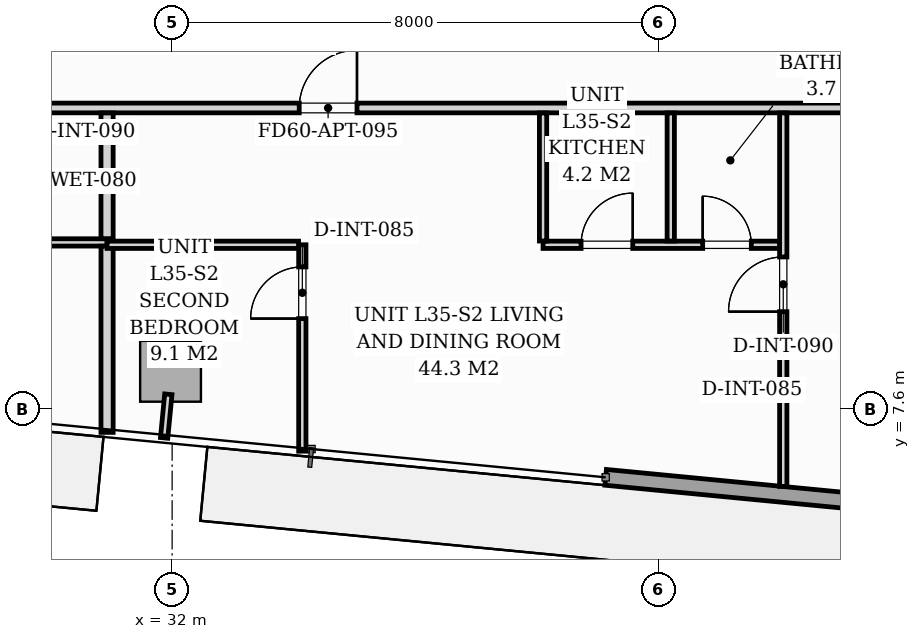
"""IFC4 building model, lengths in metres.
Left out: names, types, materials, properties, quantities, classifications, styles, units other than length and angle.
Written with IfcOpenShell. Run it as: python <this file> out.ifc"""

import sys

from ifc_helpers import new_model, si_unit, direction, frame, frame_2d, origin, origin_2d, place, context, subcontext, project, spatial, rectangle, extrude, source, transform, mapped, element, fill, save


model = new_model("IFC4")
c1 = context("Model", 3, precision=1e-05, world=origin(), true_north=direction((0.0, 1.0)))
c2 = subcontext(c1, "Body", "Model", "MODEL_VIEW")
j1 = project(units=[si_unit("LENGTHUNIT", "METRE"), si_unit("PLANEANGLEUNIT", "RADIAN")], contexts=[c1])
p1 = place(None, origin())
s1 = spatial("IfcSite", under=j1, at=p1, CompositionType="ELEMENT")
p2 = place(p1, origin())
s2 = spatial("IfcBuilding", under=s1, at=p2, CompositionType="ELEMENT")
p3 = place(p2, frame((0.0, 0.0, 124.6)))
s3 = spatial("IfcBuildingStorey", under=s2, at=p3, CompositionType="ELEMENT", Elevation=124.6)
m1 = source(origin(), c2, "Body", "SweptSolid", [
    extrude(rectangle(XDim=1.0, YDim=1.0, at=origin_2d()), origin(), (0.0, 0.0, 1.0), 3.194),
])
for number, where, z_axis, x_axis in (
    (1, (31.974, 8.22, 0.004), (0.0, 0.0, 1.0), (0.995, -0.096, 0.0)),
    (2, (43.521, 7.108, 0.004), (0.0, 0.0, 1.0), (0.995, -0.096, 0.0)),
):
    element("IfcColumn", number, at=place(p3, frame(where, z_axis=z_axis, x_axis=x_axis)), inside=s3, PredefinedType="COLUMN", context=c2, shape_type="MappedRepresentation", body=[
        mapped(m1, transform((0.0, 0.0, 0.0), scale=1.0)),
    ])
p4 = place(p3, frame((56.061, 4.845, 0.0), z_axis=(0.0, 0.0, 1.0), x_axis=(-0.995395976631, 0.095848055311, 0.0)))
e3 = element("IfcWall", 3, at=p4, inside=s3, PredefinedType="STANDARD", context=c2, shape_type="SweptSolid", body=[
    extrude(rectangle(XDim=17.01, YDim=0.26, at=frame_2d((8.505, 0.0))), origin(), (0.0, 0.0, 1.0), 2.94),
])
p5 = place(p4, frame((7.043, 0.0, 0.0)))
e4 = element("IfcOpeningElement", 4, at=p5, cuts=e3, PredefinedType="OPENING", context=c2, shape_type="SweptSolid", body=[
    extrude(rectangle(XDim=1.8, YDim=2.06, at=frame_2d((0.9, 1.03))), frame((0.0, 0.14, 0.0), z_axis=(0.0, -1.0, 0.0), x_axis=(1.0, 0.0, 0.0)), (0.0, 0.0, 1.0), 0.28),
])
p6 = place(p4, frame((2.05, 0.0, 0.65)))
e5 = element("IfcOpeningElement", 5, at=p6, cuts=e3, PredefinedType="OPENING", context=c2, shape_type="SweptSolid", body=[
    extrude(rectangle(XDim=1.6, YDim=1.5, at=frame_2d((0.8, 0.75))), frame((0.0, 0.14, 0.0), z_axis=(0.0, -1.0, 0.0), x_axis=(1.0, 0.0, 0.0)), (0.0, 0.0, 1.0), 0.28),
])
p7 = place(p4, frame((10.852, 0.0, 0.75)))
e6 = element("IfcOpeningElement", 6, at=p7, cuts=e3, PredefinedType="OPENING", context=c2, shape_type="SweptSolid", body=[
    extrude(rectangle(XDim=1.6, YDim=1.5, at=frame_2d((0.8, 0.75))), frame((0.0, 0.14, 0.0), z_axis=(0.0, -1.0, 0.0), x_axis=(1.0, 0.0, 0.0)), (0.0, 0.0, 1.0), 0.28),
])
p8 = place(p3, frame((22.05, 12.55, 0.0), z_axis=(0.0, 0.0, 1.0), x_axis=(1.0, 0.0, 0.0)))
e7 = element("IfcWall", 7, at=p8, inside=s3, PredefinedType="PARTITIONING", context=c2, shape_type="SweptSolid", body=[
    extrude(rectangle(XDim=23.83, YDim=0.16, at=frame_2d((11.915, 0.0))), origin(), (0.0, 0.0, 1.0), 2.94),
])
p9 = place(p8, frame((0.655, 0.0, 0.0)))
e8 = element("IfcOpeningElement", 8, at=p9, cuts=e7, PredefinedType="OPENING", context=c2, shape_type="SweptSolid", body=[
    extrude(rectangle(XDim=0.95, YDim=2.06, at=frame_2d((0.475, 1.03))), frame((0.0, 0.09, 0.0), z_axis=(0.0, -1.0, 0.0), x_axis=(1.0, 0.0, 0.0)), (0.0, 0.0, 1.0), 0.18),
])
p10 = place(p8, frame((12.04, 0.0, 0.0)))
e9 = element("IfcOpeningElement", 9, at=p10, cuts=e7, PredefinedType="OPENING", context=c2, shape_type="SweptSolid", body=[
    extrude(rectangle(XDim=0.95, YDim=2.06, at=frame_2d((0.475, 1.03))), frame((0.0, 0.09, 0.0), z_axis=(0.0, -1.0, 0.0), x_axis=(1.0, 0.0, 0.0)), (0.0, 0.0, 1.0), 0.18),
])
p11 = place(p3, frame((28.242, 10.339, 0.0), z_axis=(0.0, 0.0, 1.0), x_axis=(1.0, 0.0, 0.0)))
e10 = element("IfcWall", 10, at=p11, inside=s3, PredefinedType="PARTITIONING", context=c2, shape_type="SweptSolid", body=[
    extrude(rectangle(XDim=2.688, YDim=0.12, at=frame_2d((1.344, 0.0))), origin(), (0.0, 0.0, 1.0), 2.94),
])
p12 = place(p11, frame((0.863, 0.0, 0.0)))
e11 = element("IfcOpeningElement", 11, at=p12, cuts=e10, PredefinedType="OPENING", context=c2, shape_type="SweptSolid", body=[
    extrude(rectangle(XDim=0.8, YDim=2.02, at=frame_2d((0.4, 1.01))), frame((0.0, 0.07, 0.0), z_axis=(0.0, -1.0, 0.0), x_axis=(1.0, 0.0, 0.0)), (0.0, 0.0, 1.0), 0.14),
])
p13 = place(p3, frame((30.93, 7.215, 0.0), z_axis=(0.0, 0.0, 1.0), x_axis=(0.0, 1.0, 0.0)))
e12 = element("IfcWall", 12, at=p13, inside=s3, PredefinedType="PARTITIONING", context=c2, shape_type="SweptSolid", body=[
    extrude(rectangle(XDim=3.062, YDim=0.2, at=frame_2d((1.531, 0.0))), origin(), (0.0, 0.0, 1.0), 2.94),
])
p14 = place(p3, frame((30.93, 10.401, 0.0), z_axis=(0.0, 0.0, 1.0), x_axis=(0.0, 1.0, 0.0)))
e13 = element("IfcWall", 13, at=p14, inside=s3, PredefinedType="PARTITIONING", context=c2, shape_type="SweptSolid", body=[
    extrude(rectangle(XDim=2.067, YDim=0.2, at=frame_2d((1.034, 0.0))), origin(), (0.0, 0.0, 1.0), 2.94),
])
p15 = place(p3, frame((42.05, 6.327, 0.0), z_axis=(0.0, 0.0, 1.0), x_axis=(0.0, 1.0, 0.0)))
e14 = element("IfcWall", 14, at=p15, inside=s3, PredefinedType="PARTITIONING", context=c2, shape_type="SweptSolid", body=[
    extrude(rectangle(XDim=6.141, YDim=0.12, at=frame_2d((3.07, 0.0))), origin(), (0.0, 0.0, 1.0), 2.94),
])
p16 = place(p15, frame((2.873, 0.0, 0.0)))
e15 = element("IfcOpeningElement", 15, at=p16, cuts=e14, PredefinedType="OPENING", context=c2, shape_type="SweptSolid", body=[
    extrude(rectangle(XDim=0.9, YDim=2.05, at=frame_2d((0.45, 1.025))), frame((0.0, 0.07, 0.0), z_axis=(0.0, -1.0, 0.0), x_axis=(1.0, 0.0, 0.0)), (0.0, 0.0, 1.0), 0.14),
])
p17 = place(p3, frame((38.1, 10.3, 0.0), z_axis=(0.0, 0.0, 1.0), x_axis=(1.0, 0.0, 0.0)))
e16 = element("IfcWall", 16, at=p17, inside=s3, PredefinedType="PARTITIONING", context=c2, shape_type="SweptSolid", body=[
    extrude(rectangle(XDim=3.888, YDim=0.12, at=frame_2d((1.944, 0.0))), origin(), (0.0, 0.0, 1.0), 2.94),
])
p18 = place(p17, frame((0.625, 0.0, 0.0)))
e17 = element("IfcOpeningElement", 17, at=p18, cuts=e16, PredefinedType="OPENING", context=c2, shape_type="SweptSolid", body=[
    extrude(rectangle(XDim=0.85, YDim=2.05, at=frame_2d((0.425, 1.025))), frame((0.0, 0.07, 0.0), z_axis=(0.0, -1.0, 0.0), x_axis=(1.0, 0.0, 0.0)), (0.0, 0.0, 1.0), 0.14),
])
p19 = place(p17, frame((2.625, 0.0, 0.0)))
e18 = element("IfcOpeningElement", 18, at=p19, cuts=e16, PredefinedType="OPENING", context=c2, shape_type="SweptSolid", body=[
    extrude(rectangle(XDim=0.8, YDim=2.02, at=frame_2d((0.4, 1.01))), frame((0.0, 0.07, 0.0), z_axis=(0.0, -1.0, 0.0), x_axis=(1.0, 0.0, 0.0)), (0.0, 0.0, 1.0), 0.14),
])
for number, where, z_axis, x_axis in (
    (19, (40.2, 10.362, 0.0), (0.0, 0.0, 1.0), (0.0, 1.0, 0.0)),
    (20, (38.1, 10.362, 0.0), (0.0, 0.0, 1.0), (0.0, 1.0, 0.0)),
):
    element("IfcWall", number, at=place(p3, frame(where, z_axis=z_axis, x_axis=x_axis)), inside=s3, PredefinedType="PARTITIONING", context=c2, shape_type="SweptSolid", body=[
        extrude(rectangle(XDim=2.106, YDim=0.12, at=frame_2d((1.053, 0.0))), origin(), (0.0, 0.0, 1.0), 2.94),
    ])
p20 = place(p3, frame((34.141, 6.906, 0.0), z_axis=(0.0, 0.0, 1.0), x_axis=(0.0, 1.0, 0.0)))
e21 = element("IfcWall", 21, at=p20, inside=s3, PredefinedType="PARTITIONING", context=c2, shape_type="SweptSolid", body=[
    extrude(rectangle(XDim=3.394, YDim=0.12, at=frame_2d((1.697, 0.0))), origin(), (0.0, 0.0, 1.0), 2.94),
])
p21 = place(p20, frame((2.18, 0.0, 0.0)))
e22 = element("IfcOpeningElement", 22, at=p21, cuts=e21, PredefinedType="OPENING", context=c2, shape_type="SweptSolid", body=[
    extrude(rectangle(XDim=0.85, YDim=2.05, at=frame_2d((0.425, 1.025))), frame((0.0, 0.07, 0.0), z_axis=(0.0, -1.0, 0.0), x_axis=(1.0, 0.0, 0.0)), (0.0, 0.0, 1.0), 0.14),
])
p22 = place(p3, frame((30.93, 10.3, 0.0), z_axis=(0.0, 0.0, 1.0), x_axis=(1.0, 0.0, 0.0)))
e23 = element("IfcWall", 23, at=p22, inside=s3, PredefinedType="PARTITIONING", context=c2, shape_type="SweptSolid", body=[
    extrude(rectangle(XDim=3.149, YDim=0.12, at=frame_2d((1.575, 0.0))), origin(), (0.0, 0.0, 1.0), 2.94),
])
p23 = place(p3, frame((31.938, 7.841, 0.0), z_axis=(0.0, 0.0, 1.0), x_axis=(-0.095977354523, -0.995383517755, 0.0)))
e24 = element("IfcWall", 24, at=p23, inside=s3, PredefinedType="PARTITIONING", context=c2, shape_type="SweptSolid", body=[
    extrude(rectangle(XDim=0.72, YDim=0.12, at=frame_2d((0.36, 0.0))), origin(), (0.0, 0.0, 1.0), 2.94),
])
m2 = source(origin(), c2, "Body", "SweptSolid", [
    extrude(rectangle(XDim=0.85, YDim=2.05, at=frame_2d((0.425, 1.025))), frame((0.0, 0.025, 0.0), z_axis=(0.0, -1.0, 0.0), x_axis=(1.0, 0.0, 0.0)), (0.0, 0.0, 1.0), 0.05),
])
p24 = place(p21, origin())
e25 = element("IfcDoor", 25, at=p24, inside=s3, OperationType="SINGLE_SWING_LEFT", PredefinedType="DOOR", context=c2, shape_type="MappedRepresentation", body=[
    mapped(m2, transform((0.0, 0.0, 0.0), scale=1.0)),
])
fill(e22, e25)
m3 = source(origin(), c2, "Body", "SweptSolid", [
    extrude(rectangle(XDim=0.95, YDim=2.06, at=frame_2d((0.475, 1.03))), frame((0.0, 0.025, 0.0), z_axis=(0.0, -1.0, 0.0), x_axis=(1.0, 0.0, 0.0)), (0.0, 0.0, 1.0), 0.05),
])
p25 = place(p10, origin())
e26 = element("IfcDoor", 26, at=p25, inside=s3, OperationType="SINGLE_SWING_RIGHT", PredefinedType="DOOR", context=c2, shape_type="MappedRepresentation", body=[
    mapped(m3, transform((0.0, 0.0, 0.0), scale=1.0)),
])
fill(e9, e26)
m4 = source(origin(), c2, "Body", "SweptSolid", [
    extrude(rectangle(XDim=0.9, YDim=2.05, at=frame_2d((0.45, 1.025))), frame((0.0, 0.025, 0.0), z_axis=(0.0, -1.0, 0.0), x_axis=(1.0, 0.0, 0.0)), (0.0, 0.0, 1.0), 0.05),
])
p26 = place(p16, origin())
e27 = element("IfcDoor", 27, at=p26, inside=s3, OperationType="SINGLE_SWING_LEFT", PredefinedType="DOOR", context=c2, shape_type="MappedRepresentation", body=[
    mapped(m4, transform((0.0, 0.0, 0.0), scale=1.0)),
])
fill(e15, e27)
p27 = place(p18, origin())
e28 = element("IfcDoor", 28, at=p27, inside=s3, OperationType="SINGLE_SWING_RIGHT", PredefinedType="DOOR", context=c2, shape_type="MappedRepresentation", body=[
    mapped(m2, transform((0.0, 0.0, 0.0), scale=1.0)),
])
fill(e17, e28)
m5 = source(origin(), c2, "Body", "SweptSolid", [
    extrude(rectangle(XDim=0.8, YDim=2.02, at=frame_2d((0.4, 1.01))), frame((0.0, 0.025, 0.0), z_axis=(0.0, -1.0, 0.0), x_axis=(1.0, 0.0, 0.0)), (0.0, 0.0, 1.0), 0.05),
])
p28 = place(p19, origin())
e29 = element("IfcDoor", 29, at=p28, inside=s3, OperationType="SINGLE_SWING_LEFT", PredefinedType="DOOR", context=c2, shape_type="MappedRepresentation", body=[
    mapped(m5, transform((0.0, 0.0, 0.0), scale=1.0)),
])
fill(e18, e29)
save(model, sys.argv[1])
